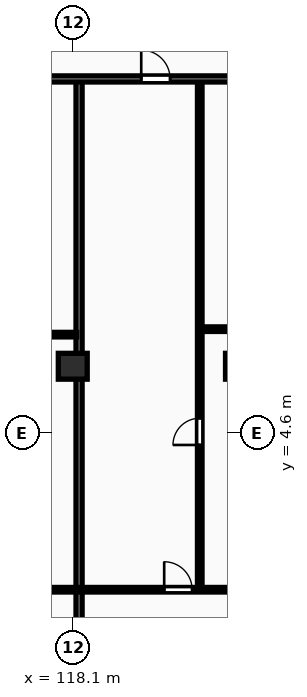
"""IFC4 building model, lengths in metres.
Left out: names, types, materials, properties, quantities, classifications, styles, units other than length and angle.
Written with IfcOpenShell. Run it as: python <this file> out.ifc"""

import sys

from ifc_helpers import new_model, si_unit, direction, frame, frame_2d, origin, origin_2d, place, context, subcontext, project, spatial, rectangle, extrude, element, fill, save


model = new_model("IFC4")
c1 = context("Model", 3, precision=1e-05, world=origin(), true_north=direction((0.0, 1.0)))
c2 = subcontext(c1, "Body", "Model", "MODEL_VIEW")
j1 = project(units=[si_unit("LENGTHUNIT", "METRE"), si_unit("PLANEANGLEUNIT", "RADIAN")], contexts=[c1])
p1 = place(None, origin())
s1 = spatial("IfcSite", under=j1, at=p1, CompositionType="ELEMENT")
p2 = place(p1, origin())
s2 = spatial("IfcBuilding", under=s1, at=p2, CompositionType="ELEMENT")
p3 = place(p2, frame((0.0, 0.0, 24.0)))
s3 = spatial("IfcBuildingStorey", under=s2, at=p3, CompositionType="ELEMENT", Elevation=24.0)
for number, where, z_axis, x_axis in (
    (1, (118.1, 6.8, 0.0), (0.0, 0.0, 1.0), (1.0, 0.0, 0.0)),
    (2, (123.6, 6.8, 0.0), (0.0, 0.0, 1.0), (1.0, 0.0, 0.0)),
):
    element("IfcColumn", number, at=place(p3, frame(where, z_axis=z_axis, x_axis=x_axis)), inside=s3, PredefinedType="COLUMN", context=c2, shape_type="SweptSolid", body=[
        extrude(rectangle(XDim=0.95, YDim=0.85, at=origin_2d()), origin(), (0.0, 0.0, 1.0), 3.25),
    ])
p4 = place(p3, frame((118.307, -10.9, 0.0), z_axis=(0.0, 0.0, 1.0), x_axis=(0.0, 1.0, 0.0)))
e3 = element("IfcWall", 3, at=p4, inside=s3, PredefinedType="PARTITIONING", context=c2, shape_type="SweptSolid", body=[
    extrude(rectangle(XDim=27.07, YDim=0.2, at=frame_2d((13.535, 0.0))), origin(), (0.0, 0.0, 1.0), 2.22),
])
p5 = place(p3, frame((109.052, 7.84, 0.0), z_axis=(0.0, 0.0, 1.0), x_axis=(1.0, 0.0, 0.0)))
e4 = element("IfcWall", 4, at=p5, inside=s3, PredefinedType="PARTITIONING", context=c2, shape_type="SweptSolid", body=[
    extrude(rectangle(XDim=9.176, YDim=0.15, at=frame_2d((4.588, 0.0))), origin(), (0.0, 0.0, 1.0), 2.97),
])
p6 = place(p5, frame((3.307, 0.0, 0.0)))
e5 = element("IfcOpeningElement", 5, at=p6, cuts=e4, PredefinedType="OPENING", context=c2, shape_type="SweptSolid", body=[
    extrude(rectangle(XDim=0.88, YDim=2.06, at=frame_2d((0.44, 1.03))), frame((0.0, 0.085, 0.0), z_axis=(0.0, -1.0, 0.0), x_axis=(1.0, 0.0, 0.0)), (0.0, 0.0, 1.0), 0.17),
])
p7 = place(p3, frame((105.101, -0.55, 0.0), z_axis=(0.0, 0.0, 1.0), x_axis=(1.0, 0.0, 0.0)))
e6 = element("IfcWall", 6, at=p7, inside=s3, PredefinedType="PARTITIONING", context=c2, shape_type="SweptSolid", body=[
    extrude(rectangle(XDim=13.126, YDim=0.15, at=frame_2d((6.563, 0.0))), origin(), (0.0, 0.0, 1.0), 2.97),
])
p8 = place(p7, frame((7.106, 0.0, 0.0)))
e7 = element("IfcOpeningElement", 7, at=p8, cuts=e6, PredefinedType="OPENING", context=c2, shape_type="SweptSolid", body=[
    extrude(rectangle(XDim=0.92, YDim=2.08, at=frame_2d((0.46, 1.04))), frame((0.0, 0.085, 0.0), z_axis=(0.0, -1.0, 0.0), x_axis=(1.0, 0.0, 0.0)), (0.0, 0.0, 1.0), 0.17),
])
p9 = place(p3, frame((122.337, 8.02, 0.0), z_axis=(0.0, 0.0, 1.0), x_axis=(1.0, 0.0, 0.0)))
e8 = element("IfcWall", 8, at=p9, inside=s3, PredefinedType="PARTITIONING", context=c2, shape_type="SweptSolid", body=[
    extrude(rectangle(XDim=10.283, YDim=0.15, at=frame_2d((5.142, 0.0))), origin(), (0.0, 0.0, 1.0), 2.97),
])
p10 = place(p9, frame((3.99, 0.0, 0.0)))
e9 = element("IfcOpeningElement", 9, at=p10, cuts=e8, PredefinedType="OPENING", context=c2, shape_type="SweptSolid", body=[
    extrude(rectangle(XDim=0.88, YDim=2.06, at=frame_2d((0.44, 1.03))), frame((0.0, 0.085, 0.0), z_axis=(0.0, -1.0, 0.0), x_axis=(1.0, 0.0, 0.0)), (0.0, 0.0, 1.0), 0.17),
])
p11 = place(p3, frame((122.277, -0.51, 0.0), z_axis=(0.0, 0.0, 1.0), x_axis=(0.0, 1.0, 0.0)))
e10 = element("IfcWall", 10, at=p11, inside=s3, PredefinedType="PARTITIONING", context=c2, shape_type="SweptSolid", body=[
    extrude(rectangle(XDim=16.7, YDim=0.15, at=frame_2d((8.35, 0.0))), origin(), (0.0, 0.0, 1.0), 2.97),
])
p12 = place(p11, frame((4.721, 0.0, 0.0)))
e11 = element("IfcOpeningElement", 11, at=p12, cuts=e10, PredefinedType="OPENING", context=c2, shape_type="SweptSolid", body=[
    extrude(rectangle(XDim=0.88, YDim=2.06, at=frame_2d((0.44, 1.03))), frame((0.0, 0.085, 0.0), z_axis=(0.0, -1.0, 0.0), x_axis=(1.0, 0.0, 0.0)), (0.0, 0.0, 1.0), 0.17),
])
p13 = place(p3, frame((118.387, -0.55, 0.0), z_axis=(0.0, 0.0, 1.0), x_axis=(1.0, 0.0, 0.0)))
e12 = element("IfcWall", 12, at=p13, inside=s3, PredefinedType="PARTITIONING", context=c2, shape_type="SweptSolid", body=[
    extrude(rectangle(XDim=14.233, YDim=0.15, at=frame_2d((7.116, 0.0))), origin(), (0.0, 0.0, 1.0), 2.97),
])
p14 = place(p13, frame((2.72, 0.0, 0.0)))
e13 = element("IfcOpeningElement", 13, at=p14, cuts=e12, PredefinedType="OPENING", context=c2, shape_type="SweptSolid", body=[
    extrude(rectangle(XDim=0.92, YDim=2.08, at=frame_2d((0.46, 1.04))), frame((0.0, 0.085, 0.0), z_axis=(0.0, -1.0, 0.0), x_axis=(1.0, 0.0, 0.0)), (0.0, 0.0, 1.0), 0.17),
])
p15 = place(p3, frame((70.7, 16.25, 0.0), z_axis=(0.0, 0.0, 1.0), x_axis=(1.0, 0.0, 0.0)))
e14 = element("IfcWall", 14, at=p15, inside=s3, PredefinedType="PARTITIONING", context=c2, shape_type="SweptSolid", body=[
    extrude(rectangle(XDim=62.0, YDim=0.2, at=frame_2d((31.0, 0.0))), origin(), (0.0, 0.0, 1.0), 2.97),
])
p16 = place(p15, frame((1.186, 0.0, 0.0)))
e15 = element("IfcOpeningElement", 15, at=p16, cuts=e14, PredefinedType="OPENING", context=c2, shape_type="SweptSolid", body=[
    extrude(rectangle(XDim=0.95, YDim=2.15, at=frame_2d((0.475, 1.075))), frame((0.0, 0.11, 0.0), z_axis=(0.0, -1.0, 0.0), x_axis=(1.0, 0.0, 0.0)), (0.0, 0.0, 1.0), 0.22),
])
p17 = place(p15, frame((13.116, 0.0, 0.0)))
e16 = element("IfcOpeningElement", 16, at=p17, cuts=e14, PredefinedType="OPENING", context=c2, shape_type="SweptSolid", body=[
    extrude(rectangle(XDim=0.95, YDim=2.15, at=frame_2d((0.475, 1.075))), frame((0.0, 0.11, 0.0), z_axis=(0.0, -1.0, 0.0), x_axis=(1.0, 0.0, 0.0)), (0.0, 0.0, 1.0), 0.22),
])
p18 = place(p15, frame((25.295, 0.0, 0.0)))
e17 = element("IfcOpeningElement", 17, at=p18, cuts=e14, PredefinedType="OPENING", context=c2, shape_type="SweptSolid", body=[
    extrude(rectangle(XDim=0.95, YDim=2.15, at=frame_2d((0.475, 1.075))), frame((0.0, 0.11, 0.0), z_axis=(0.0, -1.0, 0.0), x_axis=(1.0, 0.0, 0.0)), (0.0, 0.0, 1.0), 0.22),
])
p19 = place(p15, frame((35.747, 0.0, 0.0)))
e18 = element("IfcOpeningElement", 18, at=p19, cuts=e14, PredefinedType="OPENING", context=c2, shape_type="SweptSolid", body=[
    extrude(rectangle(XDim=0.95, YDim=2.15, at=frame_2d((0.475, 1.075))), frame((0.0, 0.11, 0.0), z_axis=(0.0, -1.0, 0.0), x_axis=(1.0, 0.0, 0.0)), (0.0, 0.0, 1.0), 0.22),
])
p20 = place(p15, frame((49.652, 0.0, 0.0)))
e19 = element("IfcOpeningElement", 19, at=p20, cuts=e14, PredefinedType="OPENING", context=c2, shape_type="SweptSolid", body=[
    extrude(rectangle(XDim=0.95, YDim=2.15, at=frame_2d((0.475, 1.075))), frame((0.0, 0.11, 0.0), z_axis=(0.0, -1.0, 0.0), x_axis=(1.0, 0.0, 0.0)), (0.0, 0.0, 1.0), 0.22),
])
p21 = place(p12, origin())
e20 = element("IfcDoor", 20, at=p21, inside=s3, OperationType="SINGLE_SWING_LEFT", PredefinedType="DOOR", context=c2, shape_type="SweptSolid", body=[
    extrude(rectangle(XDim=0.88, YDim=2.06, at=frame_2d((0.44, 1.03))), frame((0.0, 0.025, 0.0), z_axis=(0.0, -1.0, 0.0), x_axis=(1.0, 0.0, 0.0)), (0.0, 0.0, 1.0), 0.05),
])
fill(e11, e20)
p22 = place(p14, origin())
e21 = element("IfcDoor", 21, at=p22, inside=s3, OperationType="SINGLE_SWING_LEFT", PredefinedType="DOOR", context=c2, shape_type="SweptSolid", body=[
    extrude(rectangle(XDim=0.92, YDim=2.08, at=frame_2d((0.46, 1.04))), frame((0.0, 0.025, 0.0), z_axis=(0.0, -1.0, 0.0), x_axis=(1.0, 0.0, 0.0)), (0.0, 0.0, 1.0), 0.05),
])
fill(e13, e21)
p23 = place(p20, origin())
e22 = element("IfcDoor", 22, at=p23, inside=s3, OperationType="SINGLE_SWING_LEFT", PredefinedType="DOOR", context=c2, shape_type="SweptSolid", body=[
    extrude(rectangle(XDim=0.95, YDim=2.15, at=frame_2d((0.475, 1.075))), frame((0.0, 0.025, 0.0), z_axis=(0.0, -1.0, 0.0), x_axis=(1.0, 0.0, 0.0)), (0.0, 0.0, 1.0), 0.05),
])
fill(e19, e22)
save(model, sys.argv[1])
